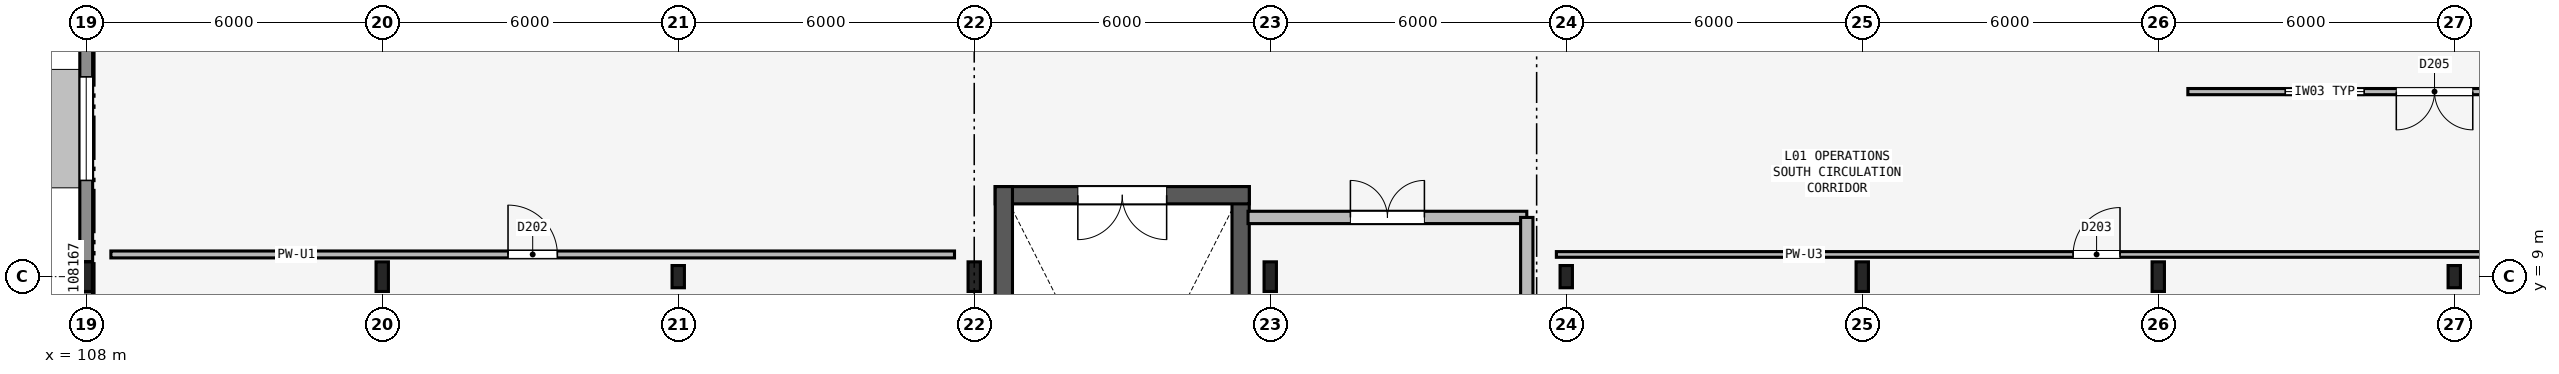
"""IFC4 building model, lengths in metres.
Left out: names, types, materials, properties, quantities, classifications, styles, units other than length and angle.
Written with IfcOpenShell. Run it as: python <this file> out.ifc"""

import sys

from ifc_helpers import new_model, si_unit, direction, frame, frame_2d, origin, origin_2d, place, context, subcontext, project, spatial, rectangle, i_section, extrude, element, fill, save


model = new_model("IFC4")
c1 = context("Model", 3, precision=1e-05, world=origin(), true_north=direction((0.0, 1.0)))
c2 = subcontext(c1, "Body", "Model", "MODEL_VIEW")
j1 = project(units=[si_unit("LENGTHUNIT", "METRE"), si_unit("PLANEANGLEUNIT", "RADIAN")], contexts=[c1])
p1 = place(None, origin())
s1 = spatial("IfcSite", under=j1, at=p1, CompositionType="ELEMENT")
p2 = place(p1, origin())
s2 = spatial("IfcBuilding", under=s1, at=p2, CompositionType="ELEMENT")
p3 = place(p2, frame((0.0, 0.0, 4.8)))
s3 = spatial("IfcBuildingStorey", under=s2, at=p3, CompositionType="ELEMENT", Elevation=4.8)
for number, where, z_axis, x_axis in (
    (1, (108.0, 9.0, 0.0), (0.0, 0.0, 1.0), (1.0, 0.0, 0.0)),
    (2, (114.0, 9.0, 0.0), (0.0, 0.0, 1.0), (1.0, 0.0, 0.0)),
):
    element("IfcColumn", number, at=place(p3, frame(where, z_axis=z_axis, x_axis=x_axis)), inside=s3, PredefinedType="COLUMN", context=c2, shape_type="SweptSolid", body=[
        extrude(i_section(OverallWidth=0.25, OverallDepth=0.6, WebThickness=0.012, FlangeThickness=0.024, FilletRadius=0.017, at=origin_2d()), origin(), (0.0, 0.0, 1.0), 4.5),
    ])
p4 = place(p3, frame((120.0, 9.0, 0.0), z_axis=(0.0, 0.0, 1.0), x_axis=(1.0, 0.0, 0.0)))
e3 = element("IfcColumn", 3, at=p4, inside=s3, PredefinedType="COLUMN", context=c2, shape_type="SweptSolid", body=[
    extrude(i_section(OverallWidth=0.25, OverallDepth=0.45, WebThickness=0.011, FlangeThickness=0.014, FilletRadius=0.015, at=origin_2d()), origin(), (0.0, 0.0, 1.0), 4.5),
])
for number, where, z_axis, x_axis in (
    (4, (126.0, 9.0, 0.0), (0.0, 0.0, 1.0), (1.0, 0.0, 0.0)),
    (5, (132.0, 9.0, 0.0), (0.0, 0.0, 1.0), (1.0, 0.0, 0.0)),
):
    element("IfcColumn", number, at=place(p3, frame(where, z_axis=z_axis, x_axis=x_axis)), inside=s3, PredefinedType="COLUMN", context=c2, shape_type="SweptSolid", body=[
        extrude(i_section(OverallWidth=0.25, OverallDepth=0.6, WebThickness=0.012, FlangeThickness=0.024, FilletRadius=0.017, at=origin_2d()), origin(), (0.0, 0.0, 1.0), 4.5),
    ])
p5 = place(p3, frame((138.0, 9.0, 0.0), z_axis=(0.0, 0.0, 1.0), x_axis=(1.0, 0.0, 0.0)))
e6 = element("IfcColumn", 6, at=p5, inside=s3, PredefinedType="COLUMN", context=c2, shape_type="SweptSolid", body=[
    extrude(i_section(OverallWidth=0.25, OverallDepth=0.45, WebThickness=0.011, FlangeThickness=0.014, FilletRadius=0.015, at=origin_2d()), origin(), (0.0, 0.0, 1.0), 4.5),
])
for number, where, z_axis, x_axis in (
    (7, (144.0, 9.0, 0.0), (0.0, 0.0, 1.0), (1.0, 0.0, 0.0)),
    (8, (150.0, 9.0, 0.0), (0.0, 0.0, 1.0), (1.0, 0.0, 0.0)),
):
    element("IfcColumn", number, at=place(p3, frame(where, z_axis=z_axis, x_axis=x_axis)), inside=s3, PredefinedType="COLUMN", context=c2, shape_type="SweptSolid", body=[
        extrude(i_section(OverallWidth=0.25, OverallDepth=0.6, WebThickness=0.012, FlangeThickness=0.024, FilletRadius=0.017, at=origin_2d()), origin(), (0.0, 0.0, 1.0), 4.5),
    ])
p6 = place(p3, frame((156.0, 9.0, 0.0), z_axis=(0.0, 0.0, 1.0), x_axis=(1.0, 0.0, 0.0)))
e9 = element("IfcColumn", 9, at=p6, inside=s3, PredefinedType="COLUMN", context=c2, shape_type="SweptSolid", body=[
    extrude(i_section(OverallWidth=0.25, OverallDepth=0.45, WebThickness=0.011, FlangeThickness=0.014, FilletRadius=0.015, at=origin_2d()), origin(), (0.0, 0.0, 1.0), 4.5),
])
p7 = place(p3, frame((108.0, 6.8, 0.0), z_axis=(0.0, 0.0, 1.0), x_axis=(0.0, 1.0, 0.0)))
e10 = element("IfcWall", 10, at=p7, inside=s3, PredefinedType="SOLIDWALL", context=c2, shape_type="SweptSolid", body=[
    extrude(rectangle(XDim=1.896, YDim=0.26, at=frame_2d((0.948, 0.0))), origin(), (0.0, 0.0, 1.0), 3.783),
])
p8 = place(p3, frame((108.0, 9.304, 0.0), z_axis=(0.0, 0.0, 1.0), x_axis=(0.0, 1.0, 0.0)))
e11 = element("IfcWall", 11, at=p8, inside=s3, PredefinedType="SOLIDWALL", context=c2, shape_type="SweptSolid", body=[
    extrude(rectangle(XDim=5.392, YDim=0.26, at=frame_2d((2.696, 0.0))), origin(), (0.0, 0.0, 1.0), 3.783),
])
p9 = place(p8, frame((1.646, 0.0, 0.9)))
e12 = element("IfcOpeningElement", 12, at=p9, cuts=e11, PredefinedType="OPENING", context=c2, shape_type="SweptSolid", body=[
    extrude(rectangle(XDim=2.1, YDim=1.5, at=frame_2d((1.05, 0.75))), frame((0.0, 0.14, 0.0), z_axis=(0.0, -1.0, 0.0), x_axis=(1.0, 0.0, 0.0)), (0.0, 0.0, 1.0), 0.28),
])
p10 = place(p3, frame((131.4, 1.075, 0.0), z_axis=(0.0, 0.0, 1.0), x_axis=(0.0, 1.0, 0.0)))
e13 = element("IfcWall", 13, at=p10, inside=s3, PredefinedType="SHEAR", context=c2, shape_type="SweptSolid", body=[
    extrude(rectangle(XDim=9.75, YDim=0.35, at=frame_2d((4.875, 0.0))), origin(), (0.0, 0.0, 1.0), 4.36),
])
p11 = place(p3, frame((131.575, 10.65, 0.0), z_axis=(0.0, 0.0, 1.0), x_axis=(-1.0, 0.0, 0.0)))
e14 = element("IfcWall", 14, at=p11, inside=s3, PredefinedType="SHEAR", context=c2, shape_type="SweptSolid", body=[
    extrude(rectangle(XDim=5.15, YDim=0.35, at=frame_2d((2.575, 0.0))), origin(), (0.0, 0.0, 1.0), 4.36),
])
p12 = place(p11, frame((1.675, 0.0, 0.0)))
e15 = element("IfcOpeningElement", 15, at=p12, cuts=e14, PredefinedType="OPENING", context=c2, shape_type="SweptSolid", body=[
    extrude(rectangle(XDim=1.8, YDim=2.2, at=frame_2d((0.9, 1.1))), frame((0.0, 0.185, 0.0), z_axis=(0.0, -1.0, 0.0), x_axis=(1.0, 0.0, 0.0)), (0.0, 0.0, 1.0), 0.37),
])
p13 = place(p3, frame((126.6, 10.825, 0.0), z_axis=(0.0, 0.0, 1.0), x_axis=(0.0, -1.0, 0.0)))
e16 = element("IfcWall", 16, at=p13, inside=s3, PredefinedType="SHEAR", context=c2, shape_type="SweptSolid", body=[
    extrude(rectangle(XDim=9.75, YDim=0.35, at=frame_2d((4.875, 0.0))), origin(), (0.0, 0.0, 1.0), 4.36),
])
p14 = place(p3, frame((131.55, 10.2, 0.0), z_axis=(0.0, 0.0, 1.0), x_axis=(1.0, 0.0, 0.0)))
e17 = element("IfcWall", 17, at=p14, inside=s3, PredefinedType="PARTITIONING", context=c2, shape_type="SweptSolid", body=[
    extrude(rectangle(XDim=5.65, YDim=0.25, at=frame_2d((2.825, 0.0))), origin(), (0.0, 0.0, 1.0), 3.783),
])
p15 = place(p14, frame((2.075, 0.0, 0.0)))
e18 = element("IfcOpeningElement", 18, at=p15, cuts=e17, PredefinedType="OPENING", context=c2, shape_type="SweptSolid", body=[
    extrude(rectangle(XDim=1.5, YDim=2.15, at=frame_2d((0.75, 1.075))), frame((0.0, 0.135, 0.0), z_axis=(0.0, -1.0, 0.0), x_axis=(1.0, 0.0, 0.0)), (0.0, 0.0, 1.0), 0.27),
])
p16 = place(p3, frame((137.2, 5.8, 0.0), z_axis=(0.0, 0.0, 1.0), x_axis=(0.0, 1.0, 0.0)))
e19 = element("IfcWall", 19, at=p16, inside=s3, PredefinedType="PARTITIONING", context=c2, shape_type="SweptSolid", body=[
    extrude(rectangle(XDim=4.4, YDim=0.25, at=frame_2d((2.2, 0.0))), origin(), (0.0, 0.0, 1.0), 3.59),
])
p17 = place(p3, frame((108.5, 9.45, 0.0), z_axis=(0.0, 0.0, 1.0), x_axis=(1.0, 0.0, 0.0)))
e20 = element("IfcWall", 20, at=p17, inside=s3, PredefinedType="PARTITIONING", context=c2, shape_type="SweptSolid", body=[
    extrude(rectangle(XDim=17.1, YDim=0.14, at=frame_2d((8.55, 0.0))), origin(), (0.0, 0.0, 1.0), 3.783),
])
p18 = place(p17, frame((8.05, 0.0, 0.0)))
e21 = element("IfcOpeningElement", 21, at=p18, cuts=e20, PredefinedType="OPENING", context=c2, shape_type="SweptSolid", body=[
    extrude(rectangle(XDim=1.0, YDim=2.15, at=frame_2d((0.5, 1.075))), frame((0.0, 0.08, 0.0), z_axis=(0.0, -1.0, 0.0), x_axis=(1.0, 0.0, 0.0)), (0.0, 0.0, 1.0), 0.16),
])
p19 = place(p3, frame((137.8, 9.45, 0.0), z_axis=(0.0, 0.0, 1.0), x_axis=(1.0, 0.0, 0.0)))
e22 = element("IfcWall", 22, at=p19, inside=s3, PredefinedType="PARTITIONING", context=c2, shape_type="SweptSolid", body=[
    extrude(rectangle(XDim=22.8, YDim=0.115, at=frame_2d((11.4, 0.0))), origin(), (0.0, 0.0, 1.0), 3.783),
])
p20 = place(p19, frame((10.475, 0.0, 0.0)))
e23 = element("IfcOpeningElement", 23, at=p20, cuts=e22, PredefinedType="OPENING", context=c2, shape_type="SweptSolid", body=[
    extrude(rectangle(XDim=0.95, YDim=2.15, at=frame_2d((0.475, 1.075))), frame((0.0, 0.067, 0.0), z_axis=(0.0, -1.0, 0.0), x_axis=(1.0, 0.0, 0.0)), (0.0, 0.0, 1.0), 0.135),
])
p21 = place(p3, frame((160.6, 12.75, 0.0), z_axis=(0.0, 0.0, 1.0), x_axis=(-1.0, 0.0, 0.0)))
e24 = element("IfcWall", 24, at=p21, inside=s3, PredefinedType="PARTITIONING", context=c2, shape_type="SweptSolid", body=[
    extrude(rectangle(XDim=10.0, YDim=0.125, at=frame_2d((5.0, 0.0))), origin(), (0.0, 0.0, 1.0), 3.783),
])
p22 = place(p21, frame((4.225, 0.0, 0.0)))
e25 = element("IfcOpeningElement", 25, at=p22, cuts=e24, PredefinedType="OPENING", context=c2, shape_type="SweptSolid", body=[
    extrude(rectangle(XDim=1.55, YDim=2.2, at=frame_2d((0.775, 1.1))), frame((0.0, 0.073, 0.0), z_axis=(0.0, -1.0, 0.0), x_axis=(1.0, 0.0, 0.0)), (0.0, 0.0, 1.0), 0.145),
])
p23 = place(p21, frame((6.425, 0.0, 1.05)))
e26 = element("IfcOpeningElement", 26, at=p23, cuts=e24, PredefinedType="OPENING", context=c2, shape_type="SweptSolid", body=[
    extrude(rectangle(XDim=1.6, YDim=1.1, at=frame_2d((0.8, 0.55))), frame((0.0, 0.073, 0.0), z_axis=(0.0, -1.0, 0.0), x_axis=(1.0, 0.0, 0.0)), (0.0, 0.0, 1.0), 0.145),
])
p24 = place(p9, origin())
e27 = element("IfcWindow", 27, at=p24, inside=s3, PartitioningType="SINGLE_PANEL", PredefinedType="WINDOW", context=c2, shape_type="SweptSolid", body=[
    extrude(rectangle(XDim=2.1, YDim=1.5, at=frame_2d((1.05, 0.75))), frame((0.0, 0.03, 0.0), z_axis=(0.0, -1.0, 0.0), x_axis=(1.0, 0.0, 0.0)), (0.0, 0.0, 1.0), 0.06),
])
fill(e12, e27)
p25 = place(p12, origin())
e28 = element("IfcDoor", 28, at=p25, inside=s3, OperationType="DOUBLE_DOOR_SINGLE_SWING", PredefinedType="DOOR", context=c2, shape_type="SweptSolid", body=[
    extrude(rectangle(XDim=1.8, YDim=2.2, at=frame_2d((0.9, 1.1))), frame((0.0, 0.025, 0.0), z_axis=(0.0, -1.0, 0.0), x_axis=(1.0, 0.0, 0.0)), (0.0, 0.0, 1.0), 0.05),
])
fill(e15, e28)
p26 = place(p15, origin())
e29 = element("IfcDoor", 29, at=p26, inside=s3, OperationType="DOUBLE_DOOR_SINGLE_SWING", PredefinedType="DOOR", context=c2, shape_type="SweptSolid", body=[
    extrude(rectangle(XDim=1.5, YDim=2.15, at=frame_2d((0.75, 1.075))), frame((0.0, 0.025, 0.0), z_axis=(0.0, -1.0, 0.0), x_axis=(1.0, 0.0, 0.0)), (0.0, 0.0, 1.0), 0.05),
])
fill(e18, e29)
p27 = place(p18, origin())
e30 = element("IfcDoor", 30, at=p27, inside=s3, OperationType="SINGLE_SWING_LEFT", PredefinedType="DOOR", context=c2, shape_type="SweptSolid", body=[
    extrude(rectangle(XDim=1.0, YDim=2.15, at=frame_2d((0.5, 1.075))), frame((0.0, 0.025, 0.0), z_axis=(0.0, -1.0, 0.0), x_axis=(1.0, 0.0, 0.0)), (0.0, 0.0, 1.0), 0.05),
])
fill(e21, e30)
p28 = place(p20, origin())
e31 = element("IfcDoor", 31, at=p28, inside=s3, OperationType="SINGLE_SWING_RIGHT", PredefinedType="DOOR", context=c2, shape_type="SweptSolid", body=[
    extrude(rectangle(XDim=0.95, YDim=2.15, at=frame_2d((0.475, 1.075))), frame((0.0, 0.025, 0.0), z_axis=(0.0, -1.0, 0.0), x_axis=(1.0, 0.0, 0.0)), (0.0, 0.0, 1.0), 0.05),
])
fill(e23, e31)
p29 = place(p22, origin())
e32 = element("IfcDoor", 32, at=p29, inside=s3, OperationType="DOUBLE_DOOR_SINGLE_SWING", PredefinedType="DOOR", context=c2, shape_type="SweptSolid", body=[
    extrude(rectangle(XDim=1.55, YDim=2.2, at=frame_2d((0.775, 1.1))), frame((0.0, 0.025, 0.0), z_axis=(0.0, -1.0, 0.0), x_axis=(1.0, 0.0, 0.0)), (0.0, 0.0, 1.0), 0.05),
])
fill(e25, e32)
p30 = place(p23, origin())
e33 = element("IfcWindow", 33, at=p30, inside=s3, PartitioningType="SINGLE_PANEL", PredefinedType="WINDOW", context=c2, shape_type="SweptSolid", body=[
    extrude(rectangle(XDim=1.6, YDim=1.1, at=frame_2d((0.8, 0.55))), frame((0.0, 0.03, 0.0), z_axis=(0.0, -1.0, 0.0), x_axis=(1.0, 0.0, 0.0)), (0.0, 0.0, 1.0), 0.06),
])
fill(e26, e33)
save(model, sys.argv[1])
